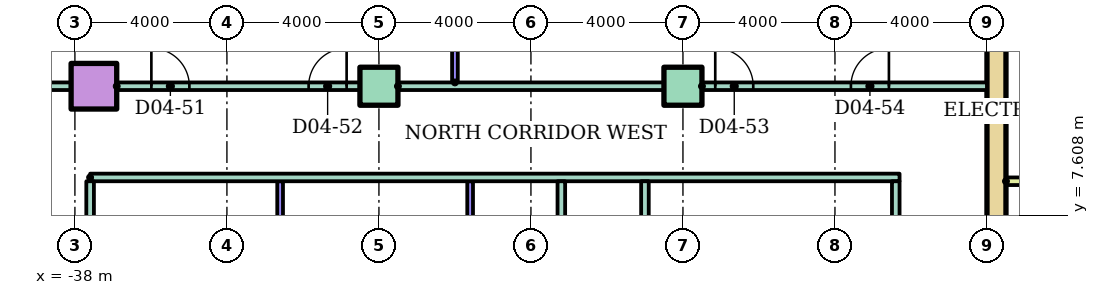
"""IFC4 building model, lengths in metres.
Left out: names, types, materials, properties, quantities, classifications, styles, units other than length and angle.
Written with IfcOpenShell. Run it as: python <this file> out.ifc"""

import sys

from ifc_helpers import new_model, si_unit, direction, frame, frame_2d, origin, origin_2d, place, context, subcontext, project, spatial, rectangle, hollow_rectangle, extrude, element, fill, save


model = new_model("IFC4")
c1 = context("Model", 3, precision=1e-05, world=origin(), true_north=direction((0.0, 1.0)))
c2 = subcontext(c1, "Body", "Model", "MODEL_VIEW")
j1 = project(units=[si_unit("LENGTHUNIT", "METRE"), si_unit("PLANEANGLEUNIT", "RADIAN")], contexts=[c1])
p1 = place(None, origin())
s1 = spatial("IfcSite", under=j1, at=p1, CompositionType="ELEMENT")
p2 = place(p1, origin())
s2 = spatial("IfcBuilding", under=s1, at=p2, CompositionType="ELEMENT")
p3 = place(p2, frame((0.0, 0.0, 18.0)))
s3 = spatial("IfcBuildingStorey", under=s2, at=p3, CompositionType="ELEMENT", Elevation=18.0)
p4 = place(p3, frame((-37.5, 11.0, 0.0)))
e1 = element("IfcColumn", 1, at=p4, inside=s3, PredefinedType="COLUMN", context=c2, shape_type="SweptSolid", body=[
    extrude(hollow_rectangle(XDim=1.2, YDim=1.2, WallThickness=0.06, at=origin_2d()), origin(), (0.0, 0.0, 1.0), 4.0),
])
for number, where in (
    (2, (-30.0, 11.0, 0.0)),
    (3, (-22.0, 11.0, 0.0)),
):
    element("IfcColumn", number, at=place(p3, frame(where)), inside=s3, PredefinedType="COLUMN", context=c2, shape_type="SweptSolid", body=[
        extrude(rectangle(XDim=1.0, YDim=1.0, at=origin_2d()), origin(), (0.0, 0.0, 1.0), 4.0),
    ])
p5 = place(p3, frame((-13.75, 3.0, 0.0), z_axis=(0.0, 0.0, 1.0), x_axis=(0.0, 1.0, 0.0)))
e4 = element("IfcWall", 4, at=p5, inside=s3, PredefinedType="SHEAR", context=c2, shape_type="SweptSolid", body=[
    extrude(rectangle(XDim=17.0, YDim=0.5, at=frame_2d((8.5, 0.0))), origin(), (0.0, 0.0, 1.0), 3.7),
])
p6 = place(p3, frame((-13.5, 8.5, 0.0)))
e5 = element("IfcWall", 5, at=p6, inside=s3, PredefinedType="PARTITIONING", context=c2, shape_type="SweptSolid", body=[
    extrude(rectangle(XDim=3.9, YDim=0.2, at=frame_2d((1.95, 0.0))), origin(), (0.0, 0.0, 1.0), 3.7),
])
p7 = place(p3, frame((-37.6, 8.6, 0.0)))
e6 = element("IfcWall", 6, at=p7, inside=s3, PredefinedType="PARTITIONING", context=c2, shape_type="SweptSolid", body=[
    extrude(rectangle(XDim=21.3, YDim=0.2, at=frame_2d((10.65, 0.0))), origin(), (0.0, 0.0, 1.0), 3.7),
])
p8 = place(p3, frame((-39.6, 11.0, 0.0)))
e7 = element("IfcWall", 7, at=p8, inside=s3, PredefinedType="PARTITIONING", context=c2, shape_type="SweptSolid", body=[
    extrude(rectangle(XDim=1.5, YDim=0.2, at=frame_2d((0.75, 0.0))), origin(), (0.0, 0.0, 1.0), 3.7),
])
p9 = place(p3, frame((-36.9, 11.0, 0.0)))
e8 = element("IfcWall", 8, at=p9, inside=s3, PredefinedType="PARTITIONING", context=c2, shape_type="SweptSolid", body=[
    extrude(rectangle(XDim=6.4, YDim=0.2, at=frame_2d((3.2, 0.0))), origin(), (0.0, 0.0, 1.0), 3.7),
])
p10 = place(p9, frame((0.912, 0.0, 0.0)))
e9 = element("IfcOpeningElement", 9, at=p10, cuts=e8, PredefinedType="OPENING", context=c2, shape_type="SweptSolid", body=[
    extrude(rectangle(XDim=1.0, YDim=2.1, at=frame_2d((0.5, 1.05))), frame((0.0, 0.11, 0.0), z_axis=(0.0, -1.0, 0.0), x_axis=(1.0, 0.0, 0.0)), (0.0, 0.0, 1.0), 0.22),
])
p11 = place(p9, frame((5.05, 0.0, 0.0)))
e10 = element("IfcOpeningElement", 10, at=p11, cuts=e8, PredefinedType="OPENING", context=c2, shape_type="SweptSolid", body=[
    extrude(rectangle(XDim=1.0, YDim=2.1, at=frame_2d((0.5, 1.05))), frame((0.0, 0.11, 0.0), z_axis=(0.0, -1.0, 0.0), x_axis=(1.0, 0.0, 0.0)), (0.0, 0.0, 1.0), 0.22),
])
p12 = place(p3, frame((-29.5, 11.0, 0.0)))
e11 = element("IfcWall", 11, at=p12, inside=s3, PredefinedType="PARTITIONING", context=c2, shape_type="SweptSolid", body=[
    extrude(rectangle(XDim=7.0, YDim=0.2, at=frame_2d((3.5, 0.0))), origin(), (0.0, 0.0, 1.0), 3.7),
])
p13 = place(p3, frame((-21.5, 11.0, 0.0)))
e12 = element("IfcWall", 12, at=p13, inside=s3, PredefinedType="PARTITIONING", context=c2, shape_type="SweptSolid", body=[
    extrude(rectangle(XDim=7.5, YDim=0.2, at=frame_2d((3.75, 0.0))), origin(), (0.0, 0.0, 1.0), 3.7),
])
p14 = place(p13, frame((0.35, 0.0, 0.0)))
e13 = element("IfcOpeningElement", 13, at=p14, cuts=e12, PredefinedType="OPENING", context=c2, shape_type="SweptSolid", body=[
    extrude(rectangle(XDim=1.0, YDim=2.1, at=frame_2d((0.5, 1.05))), frame((0.0, 0.11, 0.0), z_axis=(0.0, -1.0, 0.0), x_axis=(1.0, 0.0, 0.0)), (0.0, 0.0, 1.0), 0.22),
])
p15 = place(p13, frame((3.92, 0.0, 0.0)))
e14 = element("IfcOpeningElement", 14, at=p15, cuts=e12, PredefinedType="OPENING", context=c2, shape_type="SweptSolid", body=[
    extrude(rectangle(XDim=1.0, YDim=2.1, at=frame_2d((0.5, 1.05))), frame((0.0, 0.11, 0.0), z_axis=(0.0, -1.0, 0.0), x_axis=(1.0, 0.0, 0.0)), (0.0, 0.0, 1.0), 0.22),
])
p16 = place(p3, frame((-37.6, 2.6, 0.0), z_axis=(0.0, 0.0, 1.0), x_axis=(0.0, 1.0, 0.0)))
e15 = element("IfcWall", 15, at=p16, inside=s3, PredefinedType="PARTITIONING", context=c2, shape_type="SweptSolid", body=[
    extrude(rectangle(XDim=5.9, YDim=0.2, at=frame_2d((2.95, 0.0))), origin(), (0.0, 0.0, 1.0), 3.7),
])
p17 = place(p3, frame((-32.6, 1.5, 0.0), z_axis=(0.0, 0.0, 1.0), x_axis=(0.0, 1.0, 0.0)))
e16 = element("IfcWall", 16, at=p17, inside=s3, PredefinedType="PARTITIONING", context=c2, shape_type="SweptSolid", body=[
    extrude(rectangle(XDim=7.0, YDim=0.15, at=frame_2d((3.5, 0.0))), origin(), (0.0, 0.0, 1.0), 3.7),
])
p18 = place(p3, frame((-28.0, 11.1, 0.0), z_axis=(0.0, 0.0, 1.0), x_axis=(0.0, 1.0, 0.0)))
e17 = element("IfcWall", 17, at=p18, inside=s3, PredefinedType="PARTITIONING", context=c2, shape_type="SweptSolid", body=[
    extrude(rectangle(XDim=8.5, YDim=0.15, at=frame_2d((4.25, 0.0))), origin(), (0.0, 0.0, 1.0), 3.7),
])
p19 = place(p3, frame((-27.6, 1.5, 0.0), z_axis=(0.0, 0.0, 1.0), x_axis=(0.0, 1.0, 0.0)))
e18 = element("IfcWall", 18, at=p19, inside=s3, PredefinedType="PARTITIONING", context=c2, shape_type="SweptSolid", body=[
    extrude(rectangle(XDim=7.0, YDim=0.15, at=frame_2d((3.5, 0.0))), origin(), (0.0, 0.0, 1.0), 3.7),
])
for number, where, z_axis, x_axis in (
    (19, (-25.2, 1.5, 0.0), (0.0, 0.0, 1.0), (0.0, 1.0, 0.0)),
    (20, (-23.0, 1.5, 0.0), (0.0, 0.0, 1.0), (0.0, 1.0, 0.0)),
):
    element("IfcWall", number, at=place(p3, frame(where, z_axis=z_axis, x_axis=x_axis)), inside=s3, PredefinedType="PARTITIONING", context=c2, shape_type="SweptSolid", body=[
        extrude(rectangle(XDim=7.0, YDim=0.2, at=frame_2d((3.5, 0.0))), origin(), (0.0, 0.0, 1.0), 3.7),
    ])
p20 = place(p3, frame((-16.4, 1.5, 0.0), z_axis=(0.0, 0.0, 1.0), x_axis=(0.0, 1.0, 0.0)))
e21 = element("IfcWall", 21, at=p20, inside=s3, PredefinedType="PARTITIONING", context=c2, shape_type="SweptSolid", body=[
    extrude(rectangle(XDim=7.0, YDim=0.2, at=frame_2d((3.5, 0.0))), origin(), (0.0, 0.0, 1.0), 3.7),
])
p21 = place(p20, frame((3.0, 0.0, 0.0)))
e22 = element("IfcOpeningElement", 22, at=p21, cuts=e21, PredefinedType="OPENING", context=c2, shape_type="SweptSolid", body=[
    extrude(rectangle(XDim=1.0, YDim=2.1, at=frame_2d((0.5, 1.05))), frame((0.0, 0.11, 0.0), z_axis=(0.0, -1.0, 0.0), x_axis=(1.0, 0.0, 0.0)), (0.0, 0.0, 1.0), 0.22),
])
p22 = place(p10, origin())
e23 = element("IfcDoor", 23, at=p22, inside=s3, OperationType="SINGLE_SWING_LEFT", PredefinedType="DOOR", context=c2, shape_type="SweptSolid", body=[
    extrude(rectangle(XDim=1.0, YDim=2.1, at=frame_2d((0.5, 1.05))), frame((0.0, 0.025, 0.0), z_axis=(0.0, -1.0, 0.0), x_axis=(1.0, 0.0, 0.0)), (0.0, 0.0, 1.0), 0.05),
])
fill(e9, e23)
p23 = place(p11, origin())
e24 = element("IfcDoor", 24, at=p23, inside=s3, OperationType="SINGLE_SWING_RIGHT", PredefinedType="DOOR", context=c2, shape_type="SweptSolid", body=[
    extrude(rectangle(XDim=1.0, YDim=2.1, at=frame_2d((0.5, 1.05))), frame((0.0, 0.025, 0.0), z_axis=(0.0, -1.0, 0.0), x_axis=(1.0, 0.0, 0.0)), (0.0, 0.0, 1.0), 0.05),
])
fill(e10, e24)
p24 = place(p14, origin())
e25 = element("IfcDoor", 25, at=p24, inside=s3, OperationType="SINGLE_SWING_LEFT", PredefinedType="DOOR", context=c2, shape_type="SweptSolid", body=[
    extrude(rectangle(XDim=1.0, YDim=2.1, at=frame_2d((0.5, 1.05))), frame((0.0, 0.025, 0.0), z_axis=(0.0, -1.0, 0.0), x_axis=(1.0, 0.0, 0.0)), (0.0, 0.0, 1.0), 0.05),
])
fill(e13, e25)
p25 = place(p15, origin())
e26 = element("IfcDoor", 26, at=p25, inside=s3, OperationType="SINGLE_SWING_RIGHT", PredefinedType="DOOR", context=c2, shape_type="SweptSolid", body=[
    extrude(rectangle(XDim=1.0, YDim=2.1, at=frame_2d((0.5, 1.05))), frame((0.0, 0.025, 0.0), z_axis=(0.0, -1.0, 0.0), x_axis=(1.0, 0.0, 0.0)), (0.0, 0.0, 1.0), 0.05),
])
fill(e14, e26)
save(model, sys.argv[1])
